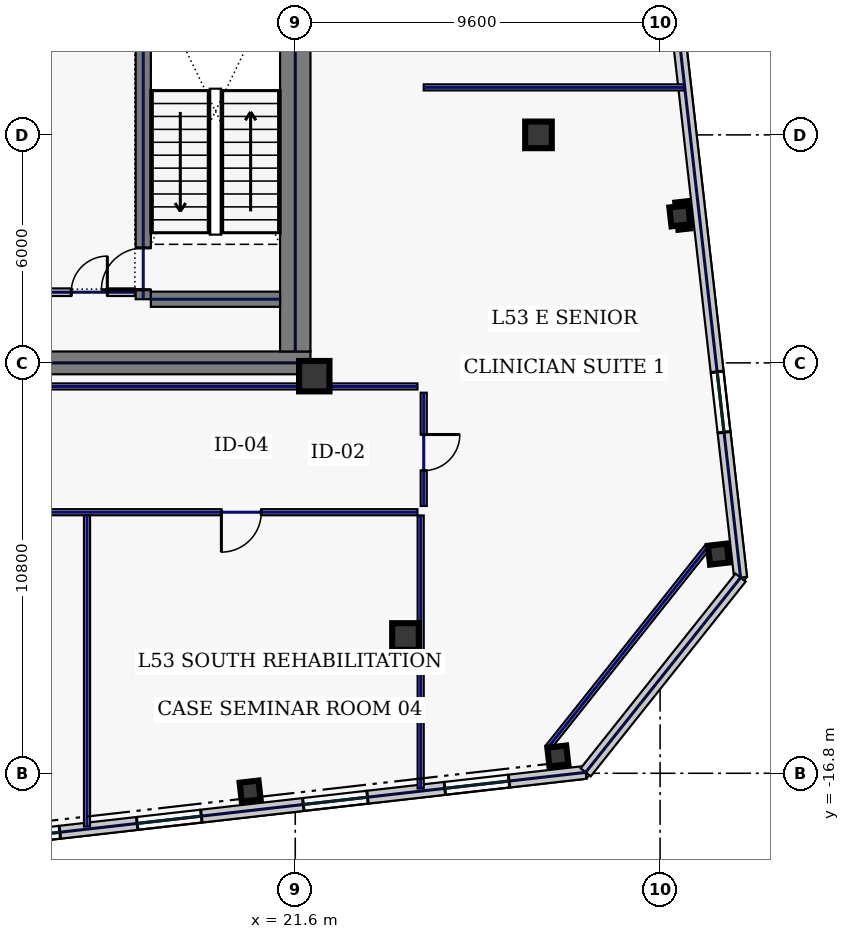
"""IFC4 building model, lengths in metres.
Left out: names, types, materials, properties, quantities, classifications, styles, units other than length and angle.
Written with IfcOpenShell. Run it as: python <this file> out.ifc"""

import sys

from ifc_helpers import new_model, si_unit, direction, frame, frame_2d, origin, origin_2d, place, context, subcontext, project, spatial, rectangle, hollow_rectangle, extrude, element, fill, save


model = new_model("IFC4")
c1 = context("Model", 3, precision=1e-05, world=origin(), true_north=direction((0.0, 1.0)))
c2 = subcontext(c1, "Body", "Model", "MODEL_VIEW")
j1 = project(units=[si_unit("LENGTHUNIT", "METRE"), si_unit("PLANEANGLEUNIT", "RADIAN")], contexts=[c1])
p1 = place(None, origin())
s1 = spatial("IfcSite", under=j1, at=p1, CompositionType="ELEMENT")
p2 = place(p1, origin())
s2 = spatial("IfcBuilding", under=s1, at=p2, CompositionType="ELEMENT")
p3 = place(p2, frame((0.0, 0.0, 230.2)))
s3 = spatial("IfcBuildingStorey", under=s2, at=p3, CompositionType="ELEMENT", Elevation=230.2)
p4 = place(p3, frame((10.5, -6.0, 0.0), z_axis=(0.0, 0.0, 1.0), x_axis=(1.0, 0.0, 0.0)))
e1 = element("IfcWall", 1, at=p4, inside=s3, PredefinedType="SHEAR", context=c2, shape_type="SweptSolid", body=[
    extrude(rectangle(XDim=11.5, YDim=0.6, at=frame_2d((5.75, 0.0))), origin(), (0.0, 0.0, 1.0), 3.74),
])
p5 = place(p3, frame((21.6, -5.7, 0.0), z_axis=(0.0, 0.0, 1.0), x_axis=(0.0, 1.0, 0.0)))
e2 = element("IfcWall", 2, at=p5, inside=s3, PredefinedType="SHEAR", context=c2, shape_type="SweptSolid", body=[
    extrude(rectangle(XDim=11.4, YDim=0.8, at=frame_2d((5.7, 0.0))), origin(), (0.0, 0.0, 1.0), 3.74),
])
p6 = place(p3, frame((17.6, -4.325, 0.0), z_axis=(0.0, 0.0, 1.0), x_axis=(0.0, 1.0, 0.0)))
e3 = element("IfcWall", 3, at=p6, inside=s3, PredefinedType="SHEAR", context=c2, shape_type="SweptSolid", body=[
    extrude(rectangle(XDim=8.65, YDim=0.4, at=frame_2d((4.325, 0.0))), origin(), (0.0, 0.0, 1.0), 3.74),
])
p7 = place(p6, frame((0.25, 0.0, 0.0)))
e4 = element("IfcOpeningElement", 4, at=p7, cuts=e3, PredefinedType="OPENING", context=c2, shape_type="SweptSolid", body=[
    extrude(rectangle(XDim=1.1, YDim=2.2, at=frame_2d((0.55, 1.1))), frame((0.0, 0.21, 0.0), z_axis=(0.0, -1.0, 0.0), x_axis=(1.0, 0.0, 0.0)), (0.0, 0.0, 1.0), 0.42),
])
p8 = place(p3, frame((17.8, -4.325, 0.0), z_axis=(0.0, 0.0, 1.0), x_axis=(1.0, 0.0, 0.0)))
e5 = element("IfcWall", 5, at=p8, inside=s3, PredefinedType="SHEAR", context=c2, shape_type="SweptSolid", body=[
    extrude(rectangle(XDim=3.4, YDim=0.4, at=frame_2d((1.7, 0.0))), origin(), (0.0, 0.0, 1.0), 3.74),
])
p9 = place(p3, frame((22.1, -6.35, 0.0), z_axis=(0.0, 0.0, 1.0), x_axis=(1.0, 0.0, 0.0)))
e6 = element("IfcColumn", 6, at=p9, inside=s3, PredefinedType="COLUMN", context=c2, shape_type="SweptSolid", body=[
    extrude(hollow_rectangle(XDim=0.8, YDim=0.8, WallThickness=0.036, at=origin_2d()), origin(), (0.0, 0.0, 1.0), 3.74),
])
for number, where, z_axis, x_axis in (
    (7, (24.5, -13.2, 0.0), (0.0, 0.0, 1.0), (1.0, 0.0, 0.0)),
    (8, (28.0, 0.0, 0.0), (0.0, 0.0, 1.0), (1.0, 0.0, 0.0)),
):
    element("IfcColumn", number, at=place(p3, frame(where, z_axis=z_axis, x_axis=x_axis)), inside=s3, PredefinedType="COLUMN", context=c2, shape_type="SweptSolid", body=[
        extrude(hollow_rectangle(XDim=0.7, YDim=0.7, WallThickness=0.032, at=origin_2d()), origin(), (0.0, 0.0, 1.0), 3.74),
    ])
for number, where, z_axis, x_axis in (
    (9, (20.412, -17.268, 0.0), (0.0, 0.0, 1.0), (0.994, 0.113, 0.0)),
    (10, (28.509, -16.345, 0.0), (0.0, 0.0, 1.0), (0.994, 0.113, 0.0)),
    (11, (32.734, -11.033, 0.0), (0.0, 0.0, 1.0), (0.994, 0.113, 0.0)),
    (12, (31.72, -2.131, 0.0), (0.0, 0.0, 1.0), (0.994, 0.113, 0.0)),
):
    element("IfcColumn", number, at=place(p3, frame(where, z_axis=z_axis, x_axis=x_axis)), inside=s3, PredefinedType="COLUMN", context=c2, shape_type="SweptSolid", body=[
        extrude(hollow_rectangle(XDim=0.5, YDim=0.5, WallThickness=0.025, at=origin_2d()), origin(), (0.0, 0.0, 1.0), 3.74),
    ])
p10 = place(p3, frame((10.71, -18.886, 0.0), z_axis=(0.0, 0.0, 1.0), x_axis=(0.993572271362, 0.113199565282, 0.0)))
e13 = element("IfcWall", 13, at=p10, inside=s3, PredefinedType="STANDARD", context=c2, shape_type="SweptSolid", body=[
    extrude(rectangle(XDim=18.651, YDim=0.34, at=frame_2d((9.326, 0.0))), origin(), (0.0, 0.0, 1.0), 3.74),
])
p11 = place(p10, frame((3.024, 0.0, 0.88)))
e14 = element("IfcOpeningElement", 14, at=p11, cuts=e13, PredefinedType="OPENING", context=c2, shape_type="SweptSolid", body=[
    extrude(rectangle(XDim=1.7, YDim=1.95, at=frame_2d((0.85, 0.975))), frame((0.0, 0.18, 0.0), z_axis=(0.0, -1.0, 0.0), x_axis=(1.0, 0.0, 0.0)), (0.0, 0.0, 1.0), 0.36),
])
p12 = place(p10, frame((6.773, 0.0, 0.88)))
e15 = element("IfcOpeningElement", 15, at=p12, cuts=e13, PredefinedType="OPENING", context=c2, shape_type="SweptSolid", body=[
    extrude(rectangle(XDim=1.7, YDim=1.95, at=frame_2d((0.85, 0.975))), frame((0.0, 0.18, 0.0), z_axis=(0.0, -1.0, 0.0), x_axis=(1.0, 0.0, 0.0)), (0.0, 0.0, 1.0), 0.36),
])
p13 = place(p10, frame((11.173, 0.0, 0.88)))
e16 = element("IfcOpeningElement", 16, at=p13, cuts=e13, PredefinedType="OPENING", context=c2, shape_type="SweptSolid", body=[
    extrude(rectangle(XDim=1.7, YDim=1.95, at=frame_2d((0.85, 0.975))), frame((0.0, 0.18, 0.0), z_axis=(0.0, -1.0, 0.0), x_axis=(1.0, 0.0, 0.0)), (0.0, 0.0, 1.0), 0.36),
])
p14 = place(p10, frame((14.921, 0.0, 0.88)))
e17 = element("IfcOpeningElement", 17, at=p14, cuts=e13, PredefinedType="OPENING", context=c2, shape_type="SweptSolid", body=[
    extrude(rectangle(XDim=1.7, YDim=1.95, at=frame_2d((0.85, 0.975))), frame((0.0, 0.18, 0.0), z_axis=(0.0, -1.0, 0.0), x_axis=(1.0, 0.0, 0.0)), (0.0, 0.0, 1.0), 0.36),
])
p15 = place(p3, frame((33.318, -11.651, 0.0), z_axis=(0.0, 0.0, 1.0), x_axis=(-0.11320360501, 0.9935718111, 0.0)))
e18 = element("IfcWall", 18, at=p15, inside=s3, PredefinedType="STANDARD", context=c2, shape_type="SweptSolid", body=[
    extrude(rectangle(XDim=37.2, YDim=0.34, at=frame_2d((18.6, 0.0))), origin(), (0.0, 0.0, 1.0), 3.74),
])
p16 = place(p15, frame((3.85, 0.0, 0.58)))
e19 = element("IfcOpeningElement", 19, at=p16, cuts=e18, PredefinedType="OPENING", context=c2, shape_type="SweptSolid", body=[
    extrude(rectangle(XDim=1.6, YDim=2.3, at=frame_2d((0.8, 1.15))), frame((0.0, 0.18, 0.0), z_axis=(0.0, -1.0, 0.0), x_axis=(1.0, 0.0, 0.0)), (0.0, 0.0, 1.0), 0.36),
])
p17 = place(p15, frame((14.25, 0.0, 0.75)))
e20 = element("IfcOpeningElement", 20, at=p17, cuts=e18, PredefinedType="OPENING", context=c2, shape_type="SweptSolid", body=[
    extrude(rectangle(XDim=0.85, YDim=1.85, at=frame_2d((0.425, 0.925))), frame((0.0, 0.18, 0.0), z_axis=(0.0, -1.0, 0.0), x_axis=(1.0, 0.0, 0.0)), (0.0, 0.0, 1.0), 0.36),
])
p18 = place(p15, frame((22.45, 0.0, 0.58)))
e21 = element("IfcOpeningElement", 21, at=p18, cuts=e18, PredefinedType="OPENING", context=c2, shape_type="SweptSolid", body=[
    extrude(rectangle(XDim=1.6, YDim=2.3, at=frame_2d((0.8, 1.15))), frame((0.0, 0.18, 0.0), z_axis=(0.0, -1.0, 0.0), x_axis=(1.0, 0.0, 0.0)), (0.0, 0.0, 1.0), 0.36),
])
p19 = place(p15, frame((31.75, 0.0, 0.58)))
e22 = element("IfcOpeningElement", 22, at=p19, cuts=e18, PredefinedType="OPENING", context=c2, shape_type="SweptSolid", body=[
    extrude(rectangle(XDim=1.6, YDim=2.3, at=frame_2d((0.8, 1.15))), frame((0.0, 0.18, 0.0), z_axis=(0.0, -1.0, 0.0), x_axis=(1.0, 0.0, 0.0)), (0.0, 0.0, 1.0), 0.36),
])
p20 = place(p3, frame((29.242, -16.775, 0.0), z_axis=(0.0, 0.0, 1.0), x_axis=(0.62252823689, 0.78259733853, 0.0)))
e23 = element("IfcWall", 23, at=p20, inside=s3, PredefinedType="STANDARD", context=c2, shape_type="SweptSolid", body=[
    extrude(rectangle(XDim=6.548, YDim=0.34, at=frame_2d((3.274, 0.0))), origin(), (0.0, 0.0, 1.0), 3.74),
])
p21 = place(p3, frame((14.825, -4.14, 0.0), z_axis=(0.0, 0.0, 1.0), x_axis=(1.0, 0.0, 0.0)))
e24 = element("IfcWall", 24, at=p21, inside=s3, PredefinedType="SOLIDWALL", context=c2, shape_type="SweptSolid", body=[
    extrude(rectangle(XDim=2.555, YDim=0.2, at=frame_2d((1.277, 0.0))), origin(), (0.0, 0.0, 1.0), 3.74),
])
p22 = place(p21, frame((0.88, 0.0, 0.0)))
e25 = element("IfcOpeningElement", 25, at=p22, cuts=e24, PredefinedType="OPENING", context=c2, shape_type="SweptSolid", body=[
    extrude(rectangle(XDim=0.95, YDim=2.2, at=frame_2d((0.475, 1.1))), frame((0.0, 0.11, 0.0), z_axis=(0.0, -1.0, 0.0), x_axis=(1.0, 0.0, 0.0)), (0.0, 0.0, 1.0), 0.22),
])
p23 = place(p3, frame((28.242, -16.134, 0.0), z_axis=(0.0, 0.0, 1.0), x_axis=(0.622521563328, 0.782602647064, 0.0)))
e26 = element("IfcWall", 26, at=p23, inside=s3, PredefinedType="PARTITIONING", context=c2, shape_type="SweptSolid", body=[
    extrude(rectangle(XDim=6.788, YDim=0.16, at=frame_2d((3.394, 0.0))), origin(), (0.0, 0.0, 1.0), 3.74),
])
p24 = place(p3, frame((10.63, -6.62, 0.0), z_axis=(0.0, 0.0, 1.0), x_axis=(1.0, 0.0, 0.0)))
e27 = element("IfcWall", 27, at=p24, inside=s3, PredefinedType="PARTITIONING", context=c2, shape_type="SweptSolid", body=[
    extrude(rectangle(XDim=14.185, YDim=0.16, at=frame_2d((7.093, 0.0))), origin(), (0.0, 0.0, 1.0), 3.74),
])
p25 = place(p3, frame((24.98, -6.785, 0.0), z_axis=(0.0, 0.0, 1.0), x_axis=(0.0, -1.0, 0.0)))
e28 = element("IfcWall", 28, at=p25, inside=s3, PredefinedType="PARTITIONING", context=c2, shape_type="SweptSolid", body=[
    extrude(rectangle(XDim=2.98, YDim=0.16, at=frame_2d((1.49, 0.0))), origin(), (0.0, 0.0, 1.0), 3.74),
])
p26 = place(p25, frame((1.1, 0.0, 0.0)))
e29 = element("IfcOpeningElement", 29, at=p26, cuts=e28, PredefinedType="OPENING", context=c2, shape_type="SweptSolid", body=[
    extrude(rectangle(XDim=0.95, YDim=2.2, at=frame_2d((0.475, 1.1))), frame((0.0, 0.09, 0.0), z_axis=(0.0, -1.0, 0.0), x_axis=(1.0, 0.0, 0.0)), (0.0, 0.0, 1.0), 0.18),
])
p27 = place(p3, frame((24.815, -9.93, 0.0), z_axis=(0.0, 0.0, 1.0), x_axis=(-1.0, 0.0, 0.0)))
e30 = element("IfcWall", 30, at=p27, inside=s3, PredefinedType="PARTITIONING", context=c2, shape_type="SweptSolid", body=[
    extrude(rectangle(XDim=49.63, YDim=0.16, at=frame_2d((24.815, 0.0))), origin(), (0.0, 0.0, 1.0), 3.74),
])
p28 = place(p27, frame((45.733, 0.0, 0.0)))
e31 = element("IfcOpeningElement", 31, at=p28, cuts=e30, PredefinedType="OPENING", context=c2, shape_type="SweptSolid", body=[
    extrude(rectangle(XDim=0.95, YDim=2.2, at=frame_2d((0.475, 1.1))), frame((0.0, 0.09, 0.0), z_axis=(0.0, -1.0, 0.0), x_axis=(1.0, 0.0, 0.0)), (0.0, 0.0, 1.0), 0.18),
])
p29 = place(p27, frame((39.583, 0.0, 0.0)))
e32 = element("IfcOpeningElement", 32, at=p29, cuts=e30, PredefinedType="OPENING", context=c2, shape_type="SweptSolid", body=[
    extrude(rectangle(XDim=0.95, YDim=2.2, at=frame_2d((0.475, 1.1))), frame((0.0, 0.09, 0.0), z_axis=(0.0, -1.0, 0.0), x_axis=(1.0, 0.0, 0.0)), (0.0, 0.0, 1.0), 0.18),
])
p30 = place(p27, frame((29.625, 0.0, 0.0)))
e33 = element("IfcOpeningElement", 33, at=p30, cuts=e30, PredefinedType="OPENING", context=c2, shape_type="SweptSolid", body=[
    extrude(rectangle(XDim=0.95, YDim=2.2, at=frame_2d((0.475, 1.1))), frame((0.0, 0.09, 0.0), z_axis=(0.0, -1.0, 0.0), x_axis=(1.0, 0.0, 0.0)), (0.0, 0.0, 1.0), 0.18),
])
p31 = place(p27, frame((15.46, 0.0, 0.0)))
e34 = element("IfcOpeningElement", 34, at=p31, cuts=e30, PredefinedType="OPENING", context=c2, shape_type="SweptSolid", body=[
    extrude(rectangle(XDim=0.95, YDim=2.2, at=frame_2d((0.475, 1.1))), frame((0.0, 0.09, 0.0), z_axis=(0.0, -1.0, 0.0), x_axis=(1.0, 0.0, 0.0)), (0.0, 0.0, 1.0), 0.18),
])
p32 = place(p27, frame((4.109, 0.0, 0.0)))
e35 = element("IfcOpeningElement", 35, at=p32, cuts=e30, PredefinedType="OPENING", context=c2, shape_type="SweptSolid", body=[
    extrude(rectangle(XDim=1.05, YDim=2.2, at=frame_2d((0.525, 1.1))), frame((0.0, 0.09, 0.0), z_axis=(0.0, -1.0, 0.0), x_axis=(1.0, 0.0, 0.0)), (0.0, 0.0, 1.0), 0.18),
])
p33 = place(p3, frame((24.9, -17.199, 0.0), z_axis=(0.0, 0.0, 1.0), x_axis=(0.0, 1.0, 0.0)))
e36 = element("IfcWall", 36, at=p33, inside=s3, PredefinedType="PARTITIONING", context=c2, shape_type="SweptSolid", body=[
    extrude(rectangle(XDim=7.185, YDim=0.16, at=frame_2d((3.592, 0.0))), origin(), (0.0, 0.0, 1.0), 3.74),
])
p34 = place(p3, frame((16.12, -18.2, 0.0), z_axis=(0.0, 0.0, 1.0), x_axis=(0.0, 1.0, 0.0)))
e37 = element("IfcWall", 37, at=p34, inside=s3, PredefinedType="PARTITIONING", context=c2, shape_type="SweptSolid", body=[
    extrude(rectangle(XDim=8.185, YDim=0.16, at=frame_2d((4.092, 0.0))), origin(), (0.0, 0.0, 1.0), 3.74),
])
p35 = place(p3, frame((24.98, 1.25, 0.0), z_axis=(0.0, 0.0, 1.0), x_axis=(1.0, 0.0, 0.0)))
e38 = element("IfcWall", 38, at=p35, inside=s3, PredefinedType="PARTITIONING", context=c2, shape_type="SweptSolid", body=[
    extrude(rectangle(XDim=6.848, YDim=0.16, at=frame_2d((3.424, 0.0))), origin(), (0.0, 0.0, 1.0), 3.74),
])
p36 = place(p11, origin())
e39 = element("IfcWindow", 39, at=p36, inside=s3, PartitioningType="SINGLE_PANEL", PredefinedType="WINDOW", context=c2, shape_type="SweptSolid", body=[
    extrude(rectangle(XDim=1.7, YDim=1.95, at=frame_2d((0.85, 0.975))), frame((0.0, 0.03, 0.0), z_axis=(0.0, -1.0, 0.0), x_axis=(1.0, 0.0, 0.0)), (0.0, 0.0, 1.0), 0.06),
])
fill(e14, e39)
p37 = place(p12, origin())
e40 = element("IfcWindow", 40, at=p37, inside=s3, PartitioningType="SINGLE_PANEL", PredefinedType="WINDOW", context=c2, shape_type="SweptSolid", body=[
    extrude(rectangle(XDim=1.7, YDim=1.95, at=frame_2d((0.85, 0.975))), frame((0.0, 0.03, 0.0), z_axis=(0.0, -1.0, 0.0), x_axis=(1.0, 0.0, 0.0)), (0.0, 0.0, 1.0), 0.06),
])
fill(e15, e40)
p38 = place(p13, origin())
e41 = element("IfcWindow", 41, at=p38, inside=s3, PartitioningType="SINGLE_PANEL", PredefinedType="WINDOW", context=c2, shape_type="SweptSolid", body=[
    extrude(rectangle(XDim=1.7, YDim=1.95, at=frame_2d((0.85, 0.975))), frame((0.0, 0.03, 0.0), z_axis=(0.0, -1.0, 0.0), x_axis=(1.0, 0.0, 0.0)), (0.0, 0.0, 1.0), 0.06),
])
fill(e16, e41)
p39 = place(p14, origin())
e42 = element("IfcWindow", 42, at=p39, inside=s3, PartitioningType="SINGLE_PANEL", PredefinedType="WINDOW", context=c2, shape_type="SweptSolid", body=[
    extrude(rectangle(XDim=1.7, YDim=1.95, at=frame_2d((0.85, 0.975))), frame((0.0, 0.03, 0.0), z_axis=(0.0, -1.0, 0.0), x_axis=(1.0, 0.0, 0.0)), (0.0, 0.0, 1.0), 0.06),
])
fill(e17, e42)
p40 = place(p16, origin())
e43 = element("IfcWindow", 43, at=p40, inside=s3, PartitioningType="SINGLE_PANEL", PredefinedType="WINDOW", context=c2, shape_type="SweptSolid", body=[
    extrude(rectangle(XDim=1.6, YDim=2.3, at=frame_2d((0.8, 1.15))), frame((0.0, 0.03, 0.0), z_axis=(0.0, -1.0, 0.0), x_axis=(1.0, 0.0, 0.0)), (0.0, 0.0, 1.0), 0.06),
])
fill(e19, e43)
p41 = place(p7, origin())
e44 = element("IfcDoor", 44, at=p41, inside=s3, OperationType="SINGLE_SWING_LEFT", PredefinedType="DOOR", context=c2, shape_type="SweptSolid", body=[
    extrude(rectangle(XDim=1.1, YDim=2.2, at=frame_2d((0.55, 1.1))), frame((0.0, 0.025, 0.0), z_axis=(0.0, -1.0, 0.0), x_axis=(1.0, 0.0, 0.0)), (0.0, 0.0, 1.0), 0.05),
])
fill(e4, e44)
p42 = place(p22, origin())
e45 = element("IfcDoor", 45, at=p42, inside=s3, OperationType="SINGLE_SWING_RIGHT", PredefinedType="DOOR", context=c2, shape_type="SweptSolid", body=[
    extrude(rectangle(XDim=0.95, YDim=2.2, at=frame_2d((0.475, 1.1))), frame((0.0, 0.025, 0.0), z_axis=(0.0, -1.0, 0.0), x_axis=(1.0, 0.0, 0.0)), (0.0, 0.0, 1.0), 0.05),
])
fill(e25, e45)
p43 = place(p32, origin())
e46 = element("IfcDoor", 46, at=p43, inside=s3, OperationType="SINGLE_SWING_RIGHT", PredefinedType="DOOR", context=c2, shape_type="SweptSolid", body=[
    extrude(rectangle(XDim=1.05, YDim=2.2, at=frame_2d((0.525, 1.1))), frame((0.0, 0.025, 0.0), z_axis=(0.0, -1.0, 0.0), x_axis=(1.0, 0.0, 0.0)), (0.0, 0.0, 1.0), 0.05),
])
fill(e35, e46)
p44 = place(p26, origin())
e47 = element("IfcDoor", 47, at=p44, inside=s3, OperationType="SINGLE_SWING_LEFT", PredefinedType="DOOR", context=c2, shape_type="SweptSolid", body=[
    extrude(rectangle(XDim=0.95, YDim=2.2, at=frame_2d((0.475, 1.1))), frame((0.0, 0.025, 0.0), z_axis=(0.0, -1.0, 0.0), x_axis=(1.0, 0.0, 0.0)), (0.0, 0.0, 1.0), 0.05),
])
fill(e29, e47)
save(model, sys.argv[1])
